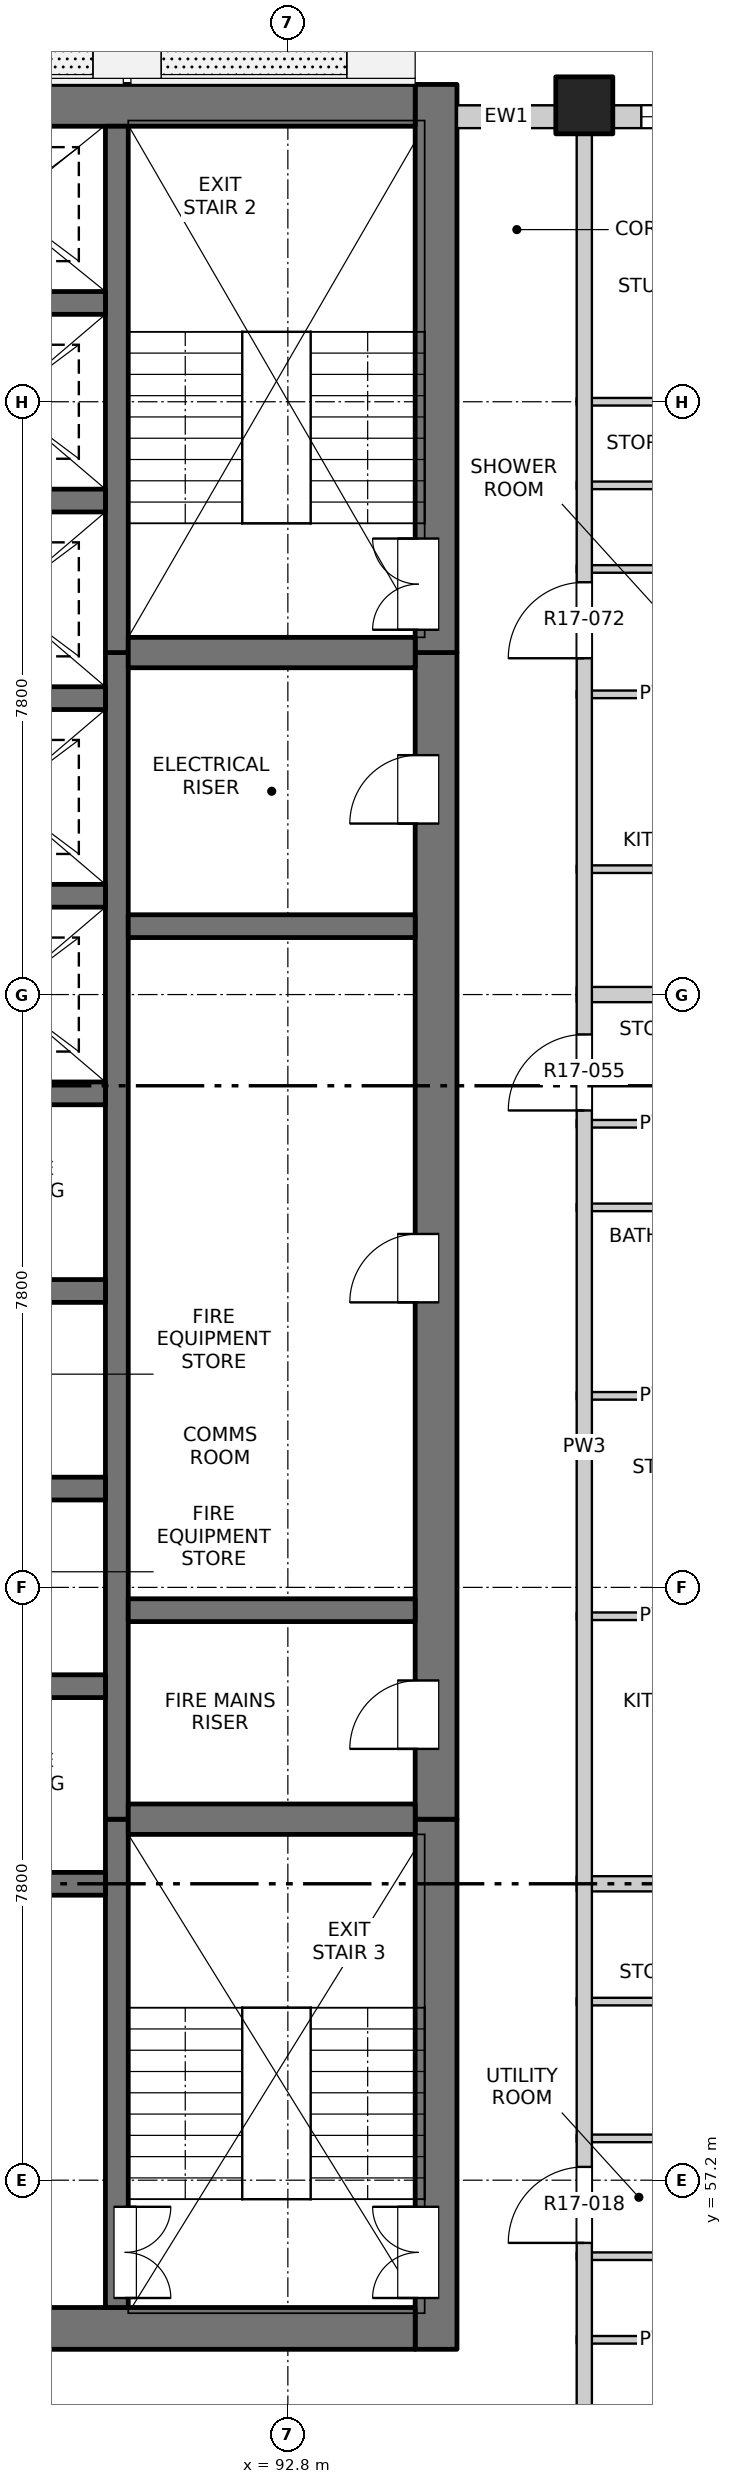
"""IFC4 building model, lengths in metres.
Left out: names, types, materials, properties, quantities, classifications, styles, units other than length and angle.
Written with IfcOpenShell. Run it as: python <this file> out.ifc"""

import sys

from ifc_helpers import new_model, si_unit, direction, frame, frame_2d, origin, origin_2d, place, context, subcontext, project, spatial, rectangle, extrude, element, fill, save


model = new_model("IFC4")
c1 = context("Model", 3, precision=1e-05, world=origin(), true_north=direction((0.0, 1.0)))
c2 = subcontext(c1, "Body", "Model", "MODEL_VIEW")
j1 = project(units=[si_unit("LENGTHUNIT", "METRE"), si_unit("PLANEANGLEUNIT", "RADIAN")], contexts=[c1])
p1 = place(None, origin())
s1 = spatial("IfcSite", under=j1, at=p1, CompositionType="ELEMENT")
p2 = place(p1, origin())
s2 = spatial("IfcBuilding", under=s1, at=p2, CompositionType="ELEMENT")
p3 = place(p2, frame((0.0, 0.0, 179.2)))
s3 = spatial("IfcBuildingStorey", under=s2, at=p3, CompositionType="ELEMENT", Elevation=179.2)
p4 = place(p3, frame((96.7, 84.5, -0.3), z_axis=(0.0, 0.0, 1.0), x_axis=(1.0, 0.0, 0.0)))
e1 = element("IfcColumn", 1, at=p4, inside=s3, PredefinedType="COLUMN", context=c2, shape_type="SweptSolid", body=[
    extrude(rectangle(XDim=0.75, YDim=0.75, at=origin_2d()), origin(), (0.0, 0.0, 1.0), 3.45),
])
p5 = place(p3, frame((94.75, 54.975, -0.3), z_axis=(0.0, 0.0, 1.0), x_axis=(0.0, 1.0, 0.0)))
e2 = element("IfcWall", 2, at=p5, inside=s3, PredefinedType="SOLIDWALL", context=c2, shape_type="SweptSolid", body=[
    extrude(rectangle(XDim=6.975, YDim=0.55, at=frame_2d((3.487, 0.0))), origin(), (0.0, 0.0, 1.0), 3.45),
])
p6 = place(p5, frame((0.675, 0.0, 0.3)))
e3 = element("IfcOpeningElement", 3, at=p6, cuts=e2, PredefinedType="OPENING", context=c2, shape_type="SweptSolid", body=[
    extrude(rectangle(XDim=1.2, YDim=2.1, at=frame_2d((0.6, 1.05))), frame((0.0, 0.285, 0.0), z_axis=(0.0, -1.0, 0.0), x_axis=(1.0, 0.0, 0.0)), (0.0, 0.0, 1.0), 0.57),
])
p7 = place(p3, frame((94.75, 61.95, -0.3), z_axis=(0.0, 0.0, 1.0), x_axis=(0.0, 1.0, 0.0)))
e4 = element("IfcWall", 4, at=p7, inside=s3, PredefinedType="SOLIDWALL", context=c2, shape_type="SweptSolid", body=[
    extrude(rectangle(XDim=15.35, YDim=0.55, at=frame_2d((7.675, 0.0))), origin(), (0.0, 0.0, 1.0), 3.45),
])
p8 = place(p7, frame((0.925, 0.0, 0.3)))
e5 = element("IfcOpeningElement", 5, at=p8, cuts=e4, PredefinedType="OPENING", context=c2, shape_type="SweptSolid", body=[
    extrude(rectangle(XDim=0.9, YDim=2.1, at=frame_2d((0.45, 1.05))), frame((0.0, 0.285, 0.0), z_axis=(0.0, -1.0, 0.0), x_axis=(1.0, 0.0, 0.0)), (0.0, 0.0, 1.0), 0.57),
])
p9 = place(p7, frame((6.8, 0.0, 0.3)))
e6 = element("IfcOpeningElement", 6, at=p9, cuts=e4, PredefinedType="OPENING", context=c2, shape_type="SweptSolid", body=[
    extrude(rectangle(XDim=0.9, YDim=2.1, at=frame_2d((0.45, 1.05))), frame((0.0, 0.285, 0.0), z_axis=(0.0, -1.0, 0.0), x_axis=(1.0, 0.0, 0.0)), (0.0, 0.0, 1.0), 0.57),
])
p10 = place(p7, frame((13.1, 0.0, 0.3)))
e7 = element("IfcOpeningElement", 7, at=p10, cuts=e4, PredefinedType="OPENING", context=c2, shape_type="SweptSolid", body=[
    extrude(rectangle(XDim=0.9, YDim=2.1, at=frame_2d((0.45, 1.05))), frame((0.0, 0.285, 0.0), z_axis=(0.0, -1.0, 0.0), x_axis=(1.0, 0.0, 0.0)), (0.0, 0.0, 1.0), 0.57),
])
p11 = place(p3, frame((94.75, 77.3, -0.3), z_axis=(0.0, 0.0, 1.0), x_axis=(0.0, 1.0, 0.0)))
e8 = element("IfcWall", 8, at=p11, inside=s3, PredefinedType="SOLIDWALL", context=c2, shape_type="SweptSolid", body=[
    extrude(rectangle(XDim=7.475, YDim=0.55, at=frame_2d((3.737, 0.0))), origin(), (0.0, 0.0, 1.0), 3.45),
])
p12 = place(p11, frame((0.3, 0.0, 0.3)))
e9 = element("IfcOpeningElement", 9, at=p12, cuts=e8, PredefinedType="OPENING", context=c2, shape_type="SweptSolid", body=[
    extrude(rectangle(XDim=1.2, YDim=2.1, at=frame_2d((0.6, 1.05))), frame((0.0, 0.285, 0.0), z_axis=(0.0, -1.0, 0.0), x_axis=(1.0, 0.0, 0.0)), (0.0, 0.0, 1.0), 0.57),
])
p13 = place(p3, frame((75.525, 55.25, -0.3), z_axis=(0.0, 0.0, 1.0), x_axis=(1.0, 0.0, 0.0)))
e10 = element("IfcWall", 10, at=p13, inside=s3, PredefinedType="SOLIDWALL", context=c2, shape_type="SweptSolid", body=[
    extrude(rectangle(XDim=18.95, YDim=0.55, at=frame_2d((9.475, 0.0))), origin(), (0.0, 0.0, 1.0), 3.45),
])
p14 = place(p13, frame((8.725, 0.0, 0.3)))
e11 = element("IfcOpeningElement", 11, at=p14, cuts=e10, PredefinedType="OPENING", context=c2, shape_type="SweptSolid", body=[
    extrude(rectangle(XDim=1.5, YDim=2.1, at=frame_2d((0.75, 1.05))), frame((0.0, 0.285, 0.0), z_axis=(0.0, -1.0, 0.0), x_axis=(1.0, 0.0, 0.0)), (0.0, 0.0, 1.0), 0.57),
])
p15 = place(p3, frame((75.525, 84.5, -0.3), z_axis=(0.0, 0.0, 1.0), x_axis=(1.0, 0.0, 0.0)))
e12 = element("IfcWall", 12, at=p15, inside=s3, PredefinedType="SOLIDWALL", context=c2, shape_type="SweptSolid", body=[
    extrude(rectangle(XDim=18.95, YDim=0.55, at=frame_2d((9.475, 0.0))), origin(), (0.0, 0.0, 1.0), 3.45),
])
p16 = place(p3, frame((90.55, 55.525, -0.3), z_axis=(0.0, 0.0, 1.0), x_axis=(0.0, 1.0, 0.0)))
e13 = element("IfcWall", 13, at=p16, inside=s3, PredefinedType="SOLIDWALL", context=c2, shape_type="SweptSolid", body=[
    extrude(rectangle(XDim=6.425, YDim=0.3, at=frame_2d((3.212, 0.0))), origin(), (0.0, 0.0, 1.0), 3.45),
])
p17 = place(p16, frame((0.125, 0.0, 0.3)))
e14 = element("IfcOpeningElement", 14, at=p17, cuts=e13, PredefinedType="OPENING", context=c2, shape_type="SweptSolid", body=[
    extrude(rectangle(XDim=1.2, YDim=2.1, at=frame_2d((0.6, 1.05))), frame((0.0, 0.16, 0.0), z_axis=(0.0, -1.0, 0.0), x_axis=(1.0, 0.0, 0.0)), (0.0, 0.0, 1.0), 0.32),
])
p18 = place(p3, frame((90.55, 61.95, -0.3), z_axis=(0.0, 0.0, 1.0), x_axis=(0.0, 1.0, 0.0)))
e15 = element("IfcWall", 15, at=p18, inside=s3, PredefinedType="SOLIDWALL", context=c2, shape_type="SweptSolid", body=[
    extrude(rectangle(XDim=15.35, YDim=0.3, at=frame_2d((7.675, 0.0))), origin(), (0.0, 0.0, 1.0), 3.45),
])
p19 = place(p3, frame((90.55, 77.3, -0.3), z_axis=(0.0, 0.0, 1.0), x_axis=(0.0, 1.0, 0.0)))
e16 = element("IfcWall", 16, at=p19, inside=s3, PredefinedType="SOLIDWALL", context=c2, shape_type="SweptSolid", body=[
    extrude(rectangle(XDim=6.925, YDim=0.3, at=frame_2d((3.462, 0.0))), origin(), (0.0, 0.0, 1.0), 3.45),
])
for number, where, z_axis, x_axis in (
    (17, (87.4, 61.1, -0.3), (0.0, 0.0, 1.0), (1.0, 0.0, 0.0)),
    (18, (87.4, 63.7, -0.3), (0.0, 0.0, 1.0), (1.0, 0.0, 0.0)),
    (19, (87.4, 66.3, -0.3), (0.0, 0.0, 1.0), (1.0, 0.0, 0.0)),
    (20, (87.4, 68.9, -0.3), (0.0, 0.0, 1.0), (1.0, 0.0, 0.0)),
    (21, (87.4, 71.5, -0.3), (0.0, 0.0, 1.0), (1.0, 0.0, 0.0)),
    (22, (87.4, 74.1, -0.3), (0.0, 0.0, 1.0), (1.0, 0.0, 0.0)),
    (23, (87.4, 76.7, -0.3), (0.0, 0.0, 1.0), (1.0, 0.0, 0.0)),
    (24, (87.4, 79.3, -0.3), (0.0, 0.0, 1.0), (1.0, 0.0, 0.0)),
    (25, (87.4, 81.9, -0.3), (0.0, 0.0, 1.0), (1.0, 0.0, 0.0)),
):
    element("IfcWall", number, at=place(p3, frame(where, z_axis=z_axis, x_axis=x_axis)), inside=s3, PredefinedType="SOLIDWALL", context=c2, shape_type="SweptSolid", body=[
        extrude(rectangle(XDim=3.0, YDim=0.3, at=frame_2d((1.5, 0.0))), origin(), (0.0, 0.0, 1.0), 3.45),
    ])
p20 = place(p3, frame((90.7, 61.95, -0.3), z_axis=(0.0, 0.0, 1.0), x_axis=(1.0, 0.0, 0.0)))
e26 = element("IfcWall", 26, at=p20, inside=s3, PredefinedType="SOLIDWALL", context=c2, shape_type="SweptSolid", body=[
    extrude(rectangle(XDim=3.775, YDim=0.4, at=frame_2d((1.888, 0.0))), origin(), (0.0, 0.0, 1.0), 3.45),
])
for number, where, z_axis, x_axis in (
    (27, (90.7, 64.7, -0.3), (0.0, 0.0, 1.0), (1.0, 0.0, 0.0)),
    (28, (90.7, 73.7, -0.3), (0.0, 0.0, 1.0), (1.0, 0.0, 0.0)),
):
    element("IfcWall", number, at=place(p3, frame(where, z_axis=z_axis, x_axis=x_axis)), inside=s3, PredefinedType="SOLIDWALL", context=c2, shape_type="SweptSolid", body=[
        extrude(rectangle(XDim=3.775, YDim=0.3, at=frame_2d((1.888, 0.0))), origin(), (0.0, 0.0, 1.0), 3.45),
    ])
p21 = place(p3, frame((90.7, 77.3, -0.3), z_axis=(0.0, 0.0, 1.0), x_axis=(1.0, 0.0, 0.0)))
e29 = element("IfcWall", 29, at=p21, inside=s3, PredefinedType="SOLIDWALL", context=c2, shape_type="SweptSolid", body=[
    extrude(rectangle(XDim=3.775, YDim=0.4, at=frame_2d((1.888, 0.0))), origin(), (0.0, 0.0, 1.0), 3.45),
])
p22 = place(p3, frame((95.025, 84.35, 0.0), z_axis=(0.0, 0.0, 1.0), x_axis=(1.0, 0.0, 0.0)))
e30 = element("IfcWall", 30, at=p22, inside=s3, PredefinedType="SOLIDWALL", context=c2, shape_type="SweptSolid", body=[
    extrude(rectangle(XDim=1.3, YDim=0.3, at=frame_2d((0.65, 0.0))), origin(), (0.0, 0.0, 1.0), 2.7),
])
p23 = place(p3, frame((97.075, 84.35, 0.0), z_axis=(0.0, 0.0, 1.0), x_axis=(1.0, 0.0, 0.0)))
e31 = element("IfcWall", 31, at=p23, inside=s3, PredefinedType="SOLIDWALL", context=c2, shape_type="SweptSolid", body=[
    extrude(rectangle(XDim=3.525, YDim=0.3, at=frame_2d((1.763, 0.0))), origin(), (0.0, 0.0, 1.0), 2.7),
])
p24 = place(p23, frame((0.375, 0.0, 0.9)))
e32 = element("IfcOpeningElement", 32, at=p24, cuts=e31, PredefinedType="OPENING", context=c2, shape_type="SweptSolid", body=[
    extrude(rectangle(XDim=2.4, YDim=1.8, at=frame_2d((1.2, 0.9))), frame((0.0, 0.16, 0.0), z_axis=(0.0, -1.0, 0.0), x_axis=(1.0, 0.0, 0.0)), (0.0, 0.0, 1.0), 0.32),
])
for number, where, z_axis, x_axis in (
    (33, (96.6, 55.1, 0.0), (0.0, 0.0, 1.0), (1.0, 0.0, 0.0)),
    (34, (96.6, 56.2, 0.0), (0.0, 0.0, 1.0), (1.0, 0.0, 0.0)),
    (35, (96.6, 57.75, 0.0), (0.0, 0.0, 1.0), (1.0, 0.0, 0.0)),
    (36, (96.6, 59.55, 0.0), (0.0, 0.0, 1.0), (1.0, 0.0, 0.0)),
):
    element("IfcWall", number, at=place(p3, frame(where, z_axis=z_axis, x_axis=x_axis)), inside=s3, PredefinedType="PARTITIONING", context=c2, shape_type="SweptSolid", body=[
        extrude(rectangle(XDim=2.22, YDim=0.1, at=frame_2d((1.11, 0.0))), origin(), (0.0, 0.0, 1.0), 3.15),
    ])
p25 = place(p3, frame((96.6, 61.1, 0.0), z_axis=(0.0, 0.0, 1.0), x_axis=(1.0, 0.0, 0.0)))
e37 = element("IfcWall", 37, at=p25, inside=s3, PredefinedType="PARTITIONING", context=c2, shape_type="SweptSolid", body=[
    extrude(rectangle(XDim=7.6, YDim=0.2, at=frame_2d((3.8, 0.0))), origin(), (0.0, 0.0, 1.0), 2.55),
])
for number, where, z_axis, x_axis in (
    (38, (96.6, 64.62, 0.0), (0.0, 0.0, 1.0), (1.0, 0.0, 0.0)),
    (39, (96.6, 67.52, 0.0), (0.0, 0.0, 1.0), (1.0, 0.0, 0.0)),
    (40, (96.6, 70.0, 0.0), (0.0, 0.0, 1.0), (1.0, 0.0, 0.0)),
    (41, (96.6, 71.1, 0.0), (0.0, 0.0, 1.0), (1.0, 0.0, 0.0)),
):
    element("IfcWall", number, at=place(p3, frame(where, z_axis=z_axis, x_axis=x_axis)), inside=s3, PredefinedType="PARTITIONING", context=c2, shape_type="SweptSolid", body=[
        extrude(rectangle(XDim=2.22, YDim=0.1, at=frame_2d((1.11, 0.0))), origin(), (0.0, 0.0, 1.0), 3.15),
    ])
p26 = place(p3, frame((96.6, 72.8, 0.0), z_axis=(0.0, 0.0, 1.0), x_axis=(1.0, 0.0, 0.0)))
e42 = element("IfcWall", 42, at=p26, inside=s3, PredefinedType="PARTITIONING", context=c2, shape_type="SweptSolid", body=[
    extrude(rectangle(XDim=7.6, YDim=0.2, at=frame_2d((3.8, 0.0))), origin(), (0.0, 0.0, 1.0), 3.15),
])
p27 = place(p3, frame((96.6, 74.45, 0.0), z_axis=(0.0, 0.0, 1.0), x_axis=(1.0, 0.0, 0.0)))
e43 = element("IfcWall", 43, at=p27, inside=s3, PredefinedType="PARTITIONING", context=c2, shape_type="SweptSolid", body=[
    extrude(rectangle(XDim=2.22, YDim=0.1, at=frame_2d((1.11, 0.0))), origin(), (0.0, 0.0, 1.0), 3.15),
])
p28 = place(p3, frame((96.6, 76.75, 0.0), z_axis=(0.0, 0.0, 1.0), x_axis=(1.0, 0.0, 0.0)))
e44 = element("IfcWall", 44, at=p28, inside=s3, PredefinedType="PARTITIONING", context=c2, shape_type="SweptSolid", body=[
    extrude(rectangle(XDim=2.22, YDim=0.1, at=frame_2d((1.11, 0.0))), origin(), (0.0, 0.0, 1.0), 2.55),
])
for number, where, z_axis, x_axis in (
    (45, (96.6, 78.4, 0.0), (0.0, 0.0, 1.0), (1.0, 0.0, 0.0)),
    (46, (96.6, 79.5, 0.0), (0.0, 0.0, 1.0), (1.0, 0.0, 0.0)),
):
    element("IfcWall", number, at=place(p3, frame(where, z_axis=z_axis, x_axis=x_axis)), inside=s3, PredefinedType="PARTITIONING", context=c2, shape_type="SweptSolid", body=[
        extrude(rectangle(XDim=2.22, YDim=0.1, at=frame_2d((1.11, 0.0))), origin(), (0.0, 0.0, 1.0), 3.15),
    ])
p29 = place(p3, frame((96.6, 80.6, 0.0), z_axis=(0.0, 0.0, 1.0), x_axis=(1.0, 0.0, 0.0)))
e47 = element("IfcWall", 47, at=p29, inside=s3, PredefinedType="PARTITIONING", context=c2, shape_type="SweptSolid", body=[
    extrude(rectangle(XDim=7.6, YDim=0.1, at=frame_2d((3.8, 0.0))), origin(), (0.0, 0.0, 1.0), 3.15),
])
p30 = place(p29, frame((2.56, 0.0, 0.0)))
e48 = element("IfcOpeningElement", 48, at=p30, cuts=e47, PredefinedType="OPENING", context=c2, shape_type="SweptSolid", body=[
    extrude(rectangle(XDim=0.9, YDim=2.1, at=frame_2d((0.45, 1.05))), frame((0.0, 0.06, 0.0), z_axis=(0.0, -1.0, 0.0), x_axis=(1.0, 0.0, 0.0)), (0.0, 0.0, 1.0), 0.12),
])
p31 = place(p3, frame((96.7, 49.5, 0.0), z_axis=(0.0, 0.0, 1.0), x_axis=(0.0, 1.0, 0.0)))
e49 = element("IfcWall", 49, at=p31, inside=s3, PredefinedType="PARTITIONING", context=c2, shape_type="SweptSolid", body=[
    extrude(rectangle(XDim=34.7, YDim=0.2, at=frame_2d((17.35, 0.0))), origin(), (0.0, 0.0, 1.0), 3.15),
])
p32 = place(p31, frame((6.875, 0.0, 0.0)))
e50 = element("IfcOpeningElement", 50, at=p32, cuts=e49, PredefinedType="OPENING", context=c2, shape_type="SweptSolid", body=[
    extrude(rectangle(XDim=1.0, YDim=2.1, at=frame_2d((0.5, 1.05))), frame((0.0, 0.11, 0.0), z_axis=(0.0, -1.0, 0.0), x_axis=(1.0, 0.0, 0.0)), (0.0, 0.0, 1.0), 0.22),
])
p33 = place(p31, frame((21.775, 0.0, 0.0)))
e51 = element("IfcOpeningElement", 51, at=p33, cuts=e49, PredefinedType="OPENING", context=c2, shape_type="SweptSolid", body=[
    extrude(rectangle(XDim=1.0, YDim=2.1, at=frame_2d((0.5, 1.05))), frame((0.0, 0.11, 0.0), z_axis=(0.0, -1.0, 0.0), x_axis=(1.0, 0.0, 0.0)), (0.0, 0.0, 1.0), 0.22),
])
p34 = place(p31, frame((27.725, 0.0, 0.0)))
e52 = element("IfcOpeningElement", 52, at=p34, cuts=e49, PredefinedType="OPENING", context=c2, shape_type="SweptSolid", body=[
    extrude(rectangle(XDim=1.0, YDim=2.1, at=frame_2d((0.5, 1.05))), frame((0.0, 0.11, 0.0), z_axis=(0.0, -1.0, 0.0), x_axis=(1.0, 0.0, 0.0)), (0.0, 0.0, 1.0), 0.22),
])
p35 = place(p24, origin())
e53 = element("IfcWindow", 53, at=p35, inside=s3, PartitioningType="DOUBLE_PANEL_VERTICAL", PredefinedType="WINDOW", context=c2, shape_type="SweptSolid", body=[
    extrude(rectangle(XDim=2.4, YDim=1.8, at=frame_2d((1.2, 0.9))), frame((0.0, 0.03, 0.0), z_axis=(0.0, -1.0, 0.0), x_axis=(1.0, 0.0, 0.0)), (0.0, 0.0, 1.0), 0.06),
])
fill(e32, e53)
p36 = place(p17, origin())
e54 = element("IfcDoor", 54, at=p36, inside=s3, OperationType="DOUBLE_DOOR_SINGLE_SWING", PredefinedType="DOOR", context=c2, shape_type="SweptSolid", body=[
    extrude(rectangle(XDim=1.2, YDim=2.1, at=frame_2d((0.6, 1.05))), frame((0.0, -0.085, 0.0), z_axis=(0.0, -1.0, 0.0), x_axis=(1.0, 0.0, 0.0)), (0.0, 0.0, 1.0), 0.05),
])
fill(e14, e54)
p37 = place(p6, origin())
e55 = element("IfcDoor", 55, at=p37, inside=s3, OperationType="DOUBLE_DOOR_SINGLE_SWING", PredefinedType="DOOR", context=c2, shape_type="SweptSolid", body=[
    extrude(rectangle(XDim=1.2, YDim=2.1, at=frame_2d((0.6, 1.05))), frame((0.0, 0.26, 0.0), z_axis=(0.0, -1.0, 0.0), x_axis=(1.0, 0.0, 0.0)), (0.0, 0.0, 1.0), 0.05),
])
fill(e3, e55)
p38 = place(p32, origin())
e56 = element("IfcDoor", 56, at=p38, inside=s3, OperationType="SINGLE_SWING_LEFT", PredefinedType="DOOR", context=c2, shape_type="SweptSolid", body=[
    extrude(rectangle(XDim=1.0, YDim=2.1, at=frame_2d((0.5, 1.05))), frame((0.0, 0.025, 0.0), z_axis=(0.0, -1.0, 0.0), x_axis=(1.0, 0.0, 0.0)), (0.0, 0.0, 1.0), 0.05),
])
fill(e50, e56)
p39 = place(p8, origin())
e57 = element("IfcDoor", 57, at=p39, inside=s3, OperationType="SINGLE_SWING_LEFT", PredefinedType="DOOR", context=c2, shape_type="SweptSolid", body=[
    extrude(rectangle(XDim=0.9, YDim=2.1, at=frame_2d((0.45, 1.05))), frame((0.0, 0.26, 0.0), z_axis=(0.0, -1.0, 0.0), x_axis=(1.0, 0.0, 0.0)), (0.0, 0.0, 1.0), 0.05),
])
fill(e5, e57)
p40 = place(p9, origin())
e58 = element("IfcDoor", 58, at=p40, inside=s3, OperationType="SINGLE_SWING_LEFT", PredefinedType="DOOR", context=c2, shape_type="SweptSolid", body=[
    extrude(rectangle(XDim=0.9, YDim=2.1, at=frame_2d((0.45, 1.05))), frame((0.0, 0.26, 0.0), z_axis=(0.0, -1.0, 0.0), x_axis=(1.0, 0.0, 0.0)), (0.0, 0.0, 1.0), 0.05),
])
fill(e6, e58)
p41 = place(p33, origin())
e59 = element("IfcDoor", 59, at=p41, inside=s3, OperationType="SINGLE_SWING_LEFT", PredefinedType="DOOR", context=c2, shape_type="SweptSolid", body=[
    extrude(rectangle(XDim=1.0, YDim=2.1, at=frame_2d((0.5, 1.05))), frame((0.0, 0.025, 0.0), z_axis=(0.0, -1.0, 0.0), x_axis=(1.0, 0.0, 0.0)), (0.0, 0.0, 1.0), 0.05),
])
fill(e51, e59)
p42 = place(p10, origin())
e60 = element("IfcDoor", 60, at=p42, inside=s3, OperationType="SINGLE_SWING_LEFT", PredefinedType="DOOR", context=c2, shape_type="SweptSolid", body=[
    extrude(rectangle(XDim=0.9, YDim=2.1, at=frame_2d((0.45, 1.05))), frame((0.0, 0.26, 0.0), z_axis=(0.0, -1.0, 0.0), x_axis=(1.0, 0.0, 0.0)), (0.0, 0.0, 1.0), 0.05),
])
fill(e7, e60)
p43 = place(p34, origin())
e61 = element("IfcDoor", 61, at=p43, inside=s3, OperationType="SINGLE_SWING_RIGHT", PredefinedType="DOOR", context=c2, shape_type="SweptSolid", body=[
    extrude(rectangle(XDim=1.0, YDim=2.1, at=frame_2d((0.5, 1.05))), frame((0.0, 0.025, 0.0), z_axis=(0.0, -1.0, 0.0), x_axis=(1.0, 0.0, 0.0)), (0.0, 0.0, 1.0), 0.05),
])
fill(e52, e61)
p44 = place(p12, origin())
e62 = element("IfcDoor", 62, at=p44, inside=s3, OperationType="DOUBLE_DOOR_SINGLE_SWING", PredefinedType="DOOR", context=c2, shape_type="SweptSolid", body=[
    extrude(rectangle(XDim=1.2, YDim=2.1, at=frame_2d((0.6, 1.05))), frame((0.0, 0.26, 0.0), z_axis=(0.0, -1.0, 0.0), x_axis=(1.0, 0.0, 0.0)), (0.0, 0.0, 1.0), 0.05),
])
fill(e9, e62)
save(model, sys.argv[1])
